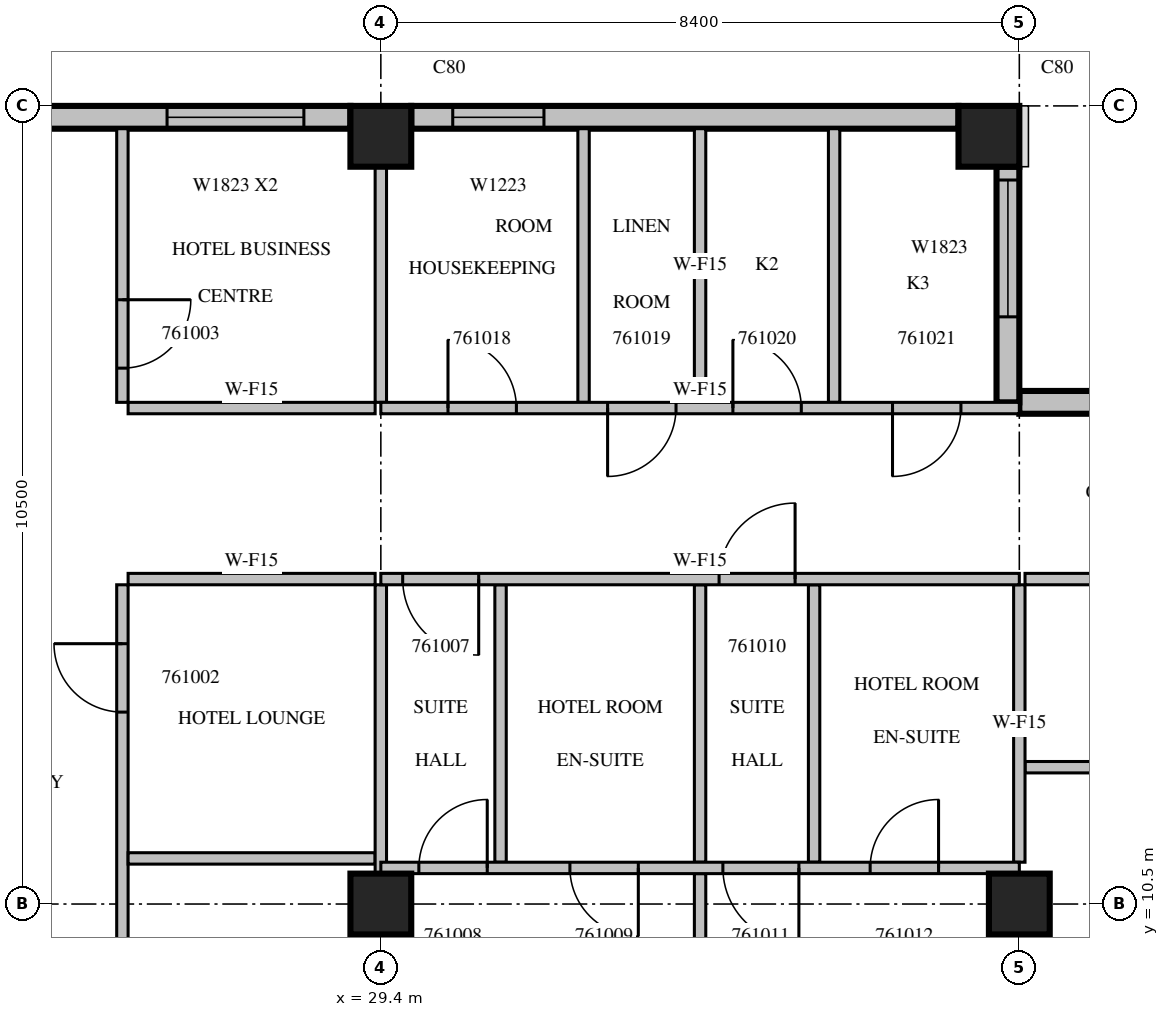
"""IFC4 building model, lengths in metres.
Left out: names, types, materials, properties, quantities, classifications, styles, units other than length and angle.
Written with IfcOpenShell. Run it as: python <this file> out.ifc"""

import sys

from ifc_helpers import new_model, si_unit, direction, frame, frame_2d, origin, origin_2d, place, context, subcontext, project, spatial, rectangle, extrude, source, transform, mapped, element, fill, save


model = new_model("IFC4")
c1 = context("Model", 3, precision=1e-05, world=origin(), true_north=direction((0.0, 1.0)))
c2 = subcontext(c1, "Body", "Model", "MODEL_VIEW")
j1 = project(units=[si_unit("LENGTHUNIT", "METRE"), si_unit("PLANEANGLEUNIT", "RADIAN")], contexts=[c1])
p1 = place(None, origin())
s1 = spatial("IfcSite", under=j1, at=p1, CompositionType="ELEMENT")
p2 = place(p1, origin())
s2 = spatial("IfcBuilding", under=s1, at=p2, CompositionType="ELEMENT")
p3 = place(p2, frame((0.0, 0.0, 265.2)))
s3 = spatial("IfcBuildingStorey", under=s2, at=p3, CompositionType="ELEMENT", Elevation=265.2)
m1 = source(origin(), c2, "Body", "SweptSolid", [
    extrude(rectangle(XDim=0.8, YDim=0.8, at=origin_2d()), origin(), (0.0, 0.0, 1.0), 3.8),
])
for number, where, z_axis, x_axis in (
    (1, (29.4, 10.5, 0.0), (0.0, 0.0, 1.0), (1.0, 0.0, 0.0)),
    (2, (37.8, 10.5, 0.0), (0.0, 0.0, 1.0), (1.0, 0.0, 0.0)),
    (3, (29.4, 20.6, 0.0), (0.0, 0.0, 1.0), (1.0, 0.0, 0.0)),
    (4, (37.4, 20.6, 0.0), (0.0, 0.0, 1.0), (1.0, 0.0, 0.0)),
):
    element("IfcColumn", number, at=place(p3, frame(where, z_axis=z_axis, x_axis=x_axis)), inside=s3, PredefinedType="COLUMN", context=c2, shape_type="MappedRepresentation", body=[
        mapped(m1, transform((0.0, 0.0, 0.0), scale=1.0)),
    ])
m2 = source(origin(), c2, "Body", "SweptSolid", [
    extrude(rectangle(XDim=15.96, YDim=0.3, at=frame_2d((7.98, 0.0))), origin(), (0.0, 0.0, 1.0), 3.4),
])
p4 = place(p3, frame((53.76, 17.1, 0.0), z_axis=(0.0, 0.0, 1.0), x_axis=(-1.0, 0.0, 0.0)))
e5 = element("IfcWall", 5, at=p4, inside=s3, PredefinedType="STANDARD", context=c2, shape_type="MappedRepresentation", body=[
    mapped(m2, transform((0.0, 0.0, 0.0), scale=1.0)),
])
m3 = source(origin(), c2, "Body", "SweptSolid", [
    extrude(rectangle(XDim=3.0, YDim=2.3, at=frame_2d((1.5, 1.15))), frame((0.0, 0.16, 0.0), z_axis=(0.0, -1.0, 0.0), x_axis=(1.0, 0.0, 0.0)), (0.0, 0.0, 1.0), 0.32),
])
p5 = place(p4, frame((0.6, 0.0, 0.6)))
e6 = element("IfcOpeningElement", 6, at=p5, cuts=e5, PredefinedType="OPENING", context=c2, shape_type="MappedRepresentation", body=[
    mapped(m3, transform((0.0, 0.0, 0.0), scale=1.0)),
])
p6 = place(p4, frame((4.8, 0.0, 0.6)))
e7 = element("IfcOpeningElement", 7, at=p6, cuts=e5, PredefinedType="OPENING", context=c2, shape_type="MappedRepresentation", body=[
    mapped(m3, transform((0.0, 0.0, 0.0), scale=1.0)),
])
m4 = source(origin(), c2, "Body", "SweptSolid", [
    extrude(rectangle(XDim=3.6, YDim=2.3, at=frame_2d((1.8, 1.15))), frame((0.0, 0.16, 0.0), z_axis=(0.0, -1.0, 0.0), x_axis=(1.0, 0.0, 0.0)), (0.0, 0.0, 1.0), 0.32),
])
p7 = place(p4, frame((9.54, 0.0, 0.6)))
e8 = element("IfcOpeningElement", 8, at=p7, cuts=e5, PredefinedType="OPENING", context=c2, shape_type="MappedRepresentation", body=[
    mapped(m4, transform((0.0, 0.0, 0.0), scale=1.0)),
])
m5 = source(origin(), c2, "Body", "SweptSolid", [
    extrude(rectangle(XDim=3.1, YDim=0.3, at=frame_2d((1.55, 0.0))), origin(), (0.0, 0.0, 1.0), 3.4),
])
p8 = place(p3, frame((37.65, 17.1, 0.0), z_axis=(0.0, 0.0, 1.0), x_axis=(0.0, 1.0, 0.0)))
e9 = element("IfcWall", 9, at=p8, inside=s3, PredefinedType="STANDARD", context=c2, shape_type="MappedRepresentation", body=[
    mapped(m5, transform((0.0, 0.0, 0.0), scale=1.0)),
])
m6 = source(origin(), c2, "Body", "SweptSolid", [
    extrude(rectangle(XDim=1.8, YDim=2.3, at=frame_2d((0.9, 1.15))), frame((0.0, 0.16, 0.0), z_axis=(0.0, -1.0, 0.0), x_axis=(1.0, 0.0, 0.0)), (0.0, 0.0, 1.0), 0.32),
])
p9 = place(p8, frame((1.125, 0.0, 0.6)))
e10 = element("IfcOpeningElement", 10, at=p9, cuts=e9, PredefinedType="OPENING", context=c2, shape_type="MappedRepresentation", body=[
    mapped(m6, transform((0.0, 0.0, 0.0), scale=1.0)),
])
m7 = source(origin(), c2, "Body", "SweptSolid", [
    extrude(rectangle(XDim=7.2, YDim=0.3, at=frame_2d((3.6, 0.0))), origin(), (0.0, 0.0, 1.0), 3.4),
])
p10 = place(p3, frame((37.0, 20.85, 0.0), z_axis=(0.0, 0.0, 1.0), x_axis=(-1.0, 0.0, 0.0)))
e11 = element("IfcWall", 11, at=p10, inside=s3, PredefinedType="STANDARD", context=c2, shape_type="MappedRepresentation", body=[
    mapped(m7, transform((0.0, 0.0, 0.0), scale=1.0)),
])
m8 = source(origin(), c2, "Body", "SweptSolid", [
    extrude(rectangle(XDim=1.2, YDim=2.3, at=frame_2d((0.6, 1.15))), frame((0.0, 0.16, 0.0), z_axis=(0.0, -1.0, 0.0), x_axis=(1.0, 0.0, 0.0)), (0.0, 0.0, 1.0), 0.32),
])
p11 = place(p10, frame((5.454, 0.0, 0.6)))
e12 = element("IfcOpeningElement", 12, at=p11, cuts=e11, PredefinedType="OPENING", context=c2, shape_type="MappedRepresentation", body=[
    mapped(m8, transform((0.0, 0.0, 0.0), scale=1.0)),
])
p12 = place(p3, frame((29.0, 20.85, 0.0), z_axis=(0.0, 0.0, 1.0), x_axis=(-1.0, 0.0, 0.0)))
e13 = element("IfcWall", 13, at=p12, inside=s3, PredefinedType="STANDARD", context=c2, shape_type="MappedRepresentation", body=[
    mapped(m7, transform((0.0, 0.0, 0.0), scale=1.0)),
])
p13 = place(p12, frame((0.613, 0.0, 0.6)))
e14 = element("IfcOpeningElement", 14, at=p13, cuts=e13, PredefinedType="OPENING", context=c2, shape_type="MappedRepresentation", body=[
    mapped(m6, transform((0.0, 0.0, 0.0), scale=1.0)),
])
p14 = place(p12, frame((5.0, 0.0, 0.6)))
e15 = element("IfcOpeningElement", 15, at=p14, cuts=e13, PredefinedType="OPENING", context=c2, shape_type="MappedRepresentation", body=[
    mapped(m6, transform((0.0, 0.0, 0.0), scale=1.0)),
])
m9 = source(origin(), c2, "Body", "SweptSolid", [
    extrude(rectangle(XDim=11.225, YDim=0.15, at=frame_2d((5.612, 0.0))), origin(), (0.0, 0.0, 1.0), 3.4),
])
p15 = place(p3, frame((26.0, 14.7, 0.0), z_axis=(0.0, 0.0, 1.0), x_axis=(0.0, -1.0, 0.0)))
e16 = element("IfcWall", 16, at=p15, inside=s3, PredefinedType="PARTITIONING", context=c2, shape_type="MappedRepresentation", body=[
    mapped(m9, transform((0.0, 0.0, 0.0), scale=1.0)),
])
m10 = source(origin(), c2, "Body", "SweptSolid", [
    extrude(rectangle(XDim=0.9, YDim=2.1, at=frame_2d((0.45, 1.05))), frame((0.0, 0.085, 0.0), z_axis=(0.0, -1.0, 0.0), x_axis=(1.0, 0.0, 0.0)), (0.0, 0.0, 1.0), 0.17),
])
p16 = place(p15, frame((7.263, 0.0, 0.0)))
e17 = element("IfcOpeningElement", 17, at=p16, cuts=e16, PredefinedType="OPENING", context=c2, shape_type="MappedRepresentation", body=[
    mapped(m10, transform((0.0, 0.0, 0.0), scale=1.0)),
])
p17 = place(p15, frame((0.775, 0.0, 0.0)))
e18 = element("IfcOpeningElement", 18, at=p17, cuts=e16, PredefinedType="OPENING", context=c2, shape_type="MappedRepresentation", body=[
    mapped(m10, transform((0.0, 0.0, 0.0), scale=1.0)),
])
m11 = source(origin(), c2, "Body", "SweptSolid", [
    extrude(rectangle(XDim=3.6, YDim=0.15, at=frame_2d((1.8, 0.0))), origin(), (0.0, 0.0, 1.0), 3.4),
])
p18 = place(p3, frame((26.0, 20.7, 0.0), z_axis=(0.0, 0.0, 1.0), x_axis=(0.0, -1.0, 0.0)))
e19 = element("IfcWall", 19, at=p18, inside=s3, PredefinedType="PARTITIONING", context=c2, shape_type="MappedRepresentation", body=[
    mapped(m11, transform((0.0, 0.0, 0.0), scale=1.0)),
])
p19 = place(p18, frame((2.25, 0.0, 0.0)))
e20 = element("IfcOpeningElement", 20, at=p19, cuts=e19, PredefinedType="OPENING", context=c2, shape_type="MappedRepresentation", body=[
    mapped(m10, transform((0.0, 0.0, 0.0), scale=1.0)),
])
m12 = source(origin(), c2, "Body", "SweptSolid", [
    extrude(rectangle(XDim=3.25, YDim=0.15, at=frame_2d((1.625, 0.0))), origin(), (0.0, 0.0, 1.0), 3.4),
])
for number, where, z_axis, x_axis in (
    (21, (29.325, 11.1, 0.0), (0.0, 0.0, 1.0), (-1.0, 0.0, 0.0)),
    (22, (29.325, 14.775, 0.0), (0.0, 0.0, 1.0), (-1.0, 0.0, 0.0)),
    (23, (26.075, 17.025, 0.0), (0.0, 0.0, 1.0), (1.0, 0.0, 0.0)),
):
    element("IfcWall", number, at=place(p3, frame(where, z_axis=z_axis, x_axis=x_axis)), inside=s3, PredefinedType="PARTITIONING", context=c2, shape_type="MappedRepresentation", body=[
        mapped(m12, transform((0.0, 0.0, 0.0), scale=1.0)),
    ])
m13 = source(origin(), c2, "Body", "SweptSolid", [
    extrude(rectangle(XDim=6.626, YDim=0.15, at=frame_2d((3.313, 0.0))), origin(), (0.0, 0.0, 1.0), 3.4),
])
p20 = place(p3, frame((29.4, 3.475, 0.0), z_axis=(0.0, 0.0, 1.0), x_axis=(0.0, 1.0, 0.0)))
e24 = element("IfcWall", 24, at=p20, inside=s3, PredefinedType="PARTITIONING", context=c2, shape_type="MappedRepresentation", body=[
    mapped(m13, transform((0.0, 0.0, 0.0), scale=1.0)),
])
m14 = source(origin(), c2, "Body", "SweptSolid", [
    extrude(rectangle(XDim=3.801, YDim=0.15, at=frame_2d((1.901, 0.0))), origin(), (0.0, 0.0, 1.0), 3.4),
])
p21 = place(p3, frame((29.4, 10.899, 0.0), z_axis=(0.0, 0.0, 1.0), x_axis=(0.0, 1.0, 0.0)))
e25 = element("IfcWall", 25, at=p21, inside=s3, PredefinedType="PARTITIONING", context=c2, shape_type="MappedRepresentation", body=[
    mapped(m14, transform((0.0, 0.0, 0.0), scale=1.0)),
])
m15 = source(origin(), c2, "Body", "SweptSolid", [
    extrude(rectangle(XDim=3.101, YDim=0.15, at=frame_2d((1.55, 0.0))), origin(), (0.0, 0.0, 1.0), 3.4),
])
p22 = place(p3, frame((29.4, 17.1, 0.0), z_axis=(0.0, 0.0, 1.0), x_axis=(0.0, 1.0, 0.0)))
e26 = element("IfcWall", 26, at=p22, inside=s3, PredefinedType="PARTITIONING", context=c2, shape_type="MappedRepresentation", body=[
    mapped(m15, transform((0.0, 0.0, 0.0), scale=1.0)),
])
m16 = source(origin(), c2, "Body", "SweptSolid", [
    extrude(rectangle(XDim=6.45, YDim=0.15, at=frame_2d((3.225, 0.0))), origin(), (0.0, 0.0, 1.0), 3.4),
])
p23 = place(p3, frame((37.875, 12.3, 0.0), z_axis=(0.0, 0.0, 1.0), x_axis=(1.0, 0.0, 0.0)))
e27 = element("IfcWall", 27, at=p23, inside=s3, PredefinedType="PARTITIONING", context=c2, shape_type="MappedRepresentation", body=[
    mapped(m16, transform((0.0, 0.0, 0.0), scale=1.0)),
])
p24 = place(p3, frame((44.325, 14.775, 0.0), z_axis=(0.0, 0.0, 1.0), x_axis=(-1.0, 0.0, 0.0)))
e28 = element("IfcWall", 28, at=p24, inside=s3, PredefinedType="PARTITIONING", context=c2, shape_type="MappedRepresentation", body=[
    mapped(m16, transform((0.0, 0.0, 0.0), scale=1.0)),
])
p25 = place(p24, frame((2.812, 0.0, 0.0)))
e29 = element("IfcOpeningElement", 29, at=p25, cuts=e28, PredefinedType="OPENING", context=c2, shape_type="MappedRepresentation", body=[
    mapped(m10, transform((0.0, 0.0, 0.0), scale=1.0)),
])
m17 = source(origin(), c2, "Body", "SweptSolid", [
    extrude(rectangle(XDim=10.6, YDim=0.15, at=frame_2d((5.3, 0.0))), origin(), (0.0, 0.0, 1.0), 3.4),
])
p26 = place(p3, frame((33.6, 0.3, 0.0), z_axis=(0.0, 0.0, 1.0), x_axis=(0.0, 1.0, 0.0)))
e30 = element("IfcWall", 30, at=p26, inside=s3, PredefinedType="PARTITIONING", context=c2, shape_type="MappedRepresentation", body=[
    mapped(m17, transform((0.0, 0.0, 0.0), scale=1.0)),
])
m18 = source(origin(), c2, "Body", "SweptSolid", [
    extrude(rectangle(XDim=3.65, YDim=0.15, at=frame_2d((1.825, 0.0))), origin(), (0.0, 0.0, 1.0), 3.4),
])
for number, where, z_axis, x_axis in (
    (31, (30.975, 11.05, 0.0), (0.0, 0.0, 1.0), (0.0, 1.0, 0.0)),
    (32, (33.6, 11.05, 0.0), (0.0, 0.0, 1.0), (0.0, 1.0, 0.0)),
    (33, (35.1, 11.05, 0.0), (0.0, 0.0, 1.0), (0.0, 1.0, 0.0)),
):
    element("IfcWall", number, at=place(p3, frame(where, z_axis=z_axis, x_axis=x_axis)), inside=s3, PredefinedType="PARTITIONING", context=c2, shape_type="MappedRepresentation", body=[
        mapped(m18, transform((0.0, 0.0, 0.0), scale=1.0)),
    ])
m19 = source(origin(), c2, "Body", "SweptSolid", [
    extrude(rectangle(XDim=9.302, YDim=0.15, at=frame_2d((4.651, 0.0))), origin(), (0.0, 0.0, 1.0), 3.4),
])
p27 = place(p3, frame((37.8, 0.799, 0.0), z_axis=(0.0, 0.0, 1.0), x_axis=(0.0, 1.0, 0.0)))
e34 = element("IfcWall", 34, at=p27, inside=s3, PredefinedType="PARTITIONING", context=c2, shape_type="MappedRepresentation", body=[
    mapped(m19, transform((0.0, 0.0, 0.0), scale=1.0)),
])
p28 = place(p3, frame((37.8, 11.05, 0.0), z_axis=(0.0, 0.0, 1.0), x_axis=(0.0, 1.0, 0.0)))
e35 = element("IfcWall", 35, at=p28, inside=s3, PredefinedType="PARTITIONING", context=c2, shape_type="MappedRepresentation", body=[
    mapped(m18, transform((0.0, 0.0, 0.0), scale=1.0)),
])
m20 = source(origin(), c2, "Body", "SweptSolid", [
    extrude(rectangle(XDim=8.4, YDim=0.15, at=frame_2d((4.2, 0.0))), origin(), (0.0, 0.0, 1.0), 3.4),
])
p29 = place(p3, frame((37.8, 10.975, 0.0), z_axis=(0.0, 0.0, 1.0), x_axis=(-1.0, 0.0, 0.0)))
e36 = element("IfcWall", 36, at=p29, inside=s3, PredefinedType="PARTITIONING", context=c2, shape_type="MappedRepresentation", body=[
    mapped(m20, transform((0.0, 0.0, 0.0), scale=1.0)),
])
p30 = place(p29, frame((7.0, 0.0, 0.0)))
e37 = element("IfcOpeningElement", 37, at=p30, cuts=e36, PredefinedType="OPENING", context=c2, shape_type="MappedRepresentation", body=[
    mapped(m10, transform((0.0, 0.0, 0.0), scale=1.0)),
])
p31 = place(p29, frame((5.013, 0.0, 0.0)))
e38 = element("IfcOpeningElement", 38, at=p31, cuts=e36, PredefinedType="OPENING", context=c2, shape_type="MappedRepresentation", body=[
    mapped(m10, transform((0.0, 0.0, 0.0), scale=1.0)),
])
m21 = source(origin(), c2, "Body", "SweptSolid", [
    extrude(rectangle(XDim=1.0, YDim=2.1, at=frame_2d((0.5, 1.05))), frame((0.0, 0.085, 0.0), z_axis=(0.0, -1.0, 0.0), x_axis=(1.0, 0.0, 0.0)), (0.0, 0.0, 1.0), 0.17),
])
p32 = place(p29, frame((2.9, 0.0, 0.0)))
e39 = element("IfcOpeningElement", 39, at=p32, cuts=e36, PredefinedType="OPENING", context=c2, shape_type="MappedRepresentation", body=[
    mapped(m21, transform((0.0, 0.0, 0.0), scale=1.0)),
])
p33 = place(p29, frame((1.062, 0.0, 0.0)))
e40 = element("IfcOpeningElement", 40, at=p33, cuts=e36, PredefinedType="OPENING", context=c2, shape_type="MappedRepresentation", body=[
    mapped(m10, transform((0.0, 0.0, 0.0), scale=1.0)),
])
for number, where, z_axis, x_axis in (
    (41, (32.067, 20.7, 0.0), (0.0, 0.0, 1.0), (0.0, -1.0, 0.0)),
    (42, (35.363, 20.7, 0.0), (0.0, 0.0, 1.0), (0.0, -1.0, 0.0)),
    (43, (33.6, 17.1, 0.0), (0.0, 0.0, 1.0), (0.0, 1.0, 0.0)),
):
    element("IfcWall", number, at=place(p3, frame(where, z_axis=z_axis, x_axis=x_axis)), inside=s3, PredefinedType="PARTITIONING", context=c2, shape_type="MappedRepresentation", body=[
        mapped(m11, transform((0.0, 0.0, 0.0), scale=1.0)),
    ])
p34 = place(p3, frame((37.8, 14.775, 0.0), z_axis=(0.0, 0.0, 1.0), x_axis=(-1.0, 0.0, 0.0)))
e44 = element("IfcWall", 44, at=p34, inside=s3, PredefinedType="PARTITIONING", context=c2, shape_type="MappedRepresentation", body=[
    mapped(m20, transform((0.0, 0.0, 0.0), scale=1.0)),
])
p35 = place(p34, frame((7.112, 0.0, 0.0)))
e45 = element("IfcOpeningElement", 45, at=p35, cuts=e44, PredefinedType="OPENING", context=c2, shape_type="MappedRepresentation", body=[
    mapped(m21, transform((0.0, 0.0, 0.0), scale=1.0)),
])
p36 = place(p34, frame((2.95, 0.0, 0.0)))
e46 = element("IfcOpeningElement", 46, at=p36, cuts=e44, PredefinedType="OPENING", context=c2, shape_type="MappedRepresentation", body=[
    mapped(m21, transform((0.0, 0.0, 0.0), scale=1.0)),
])
p37 = place(p3, frame((29.4, 17.025, 0.0), z_axis=(0.0, 0.0, 1.0), x_axis=(1.0, 0.0, 0.0)))
e47 = element("IfcWall", 47, at=p37, inside=s3, PredefinedType="PARTITIONING", context=c2, shape_type="MappedRepresentation", body=[
    mapped(m20, transform((0.0, 0.0, 0.0), scale=1.0)),
])
p38 = place(p37, frame((0.883, 0.0, 0.0)))
e48 = element("IfcOpeningElement", 48, at=p38, cuts=e47, PredefinedType="OPENING", context=c2, shape_type="MappedRepresentation", body=[
    mapped(m10, transform((0.0, 0.0, 0.0), scale=1.0)),
])
p39 = place(p37, frame((2.983, 0.0, 0.0)))
e49 = element("IfcOpeningElement", 49, at=p39, cuts=e47, PredefinedType="OPENING", context=c2, shape_type="MappedRepresentation", body=[
    mapped(m10, transform((0.0, 0.0, 0.0), scale=1.0)),
])
p40 = place(p37, frame((4.632, 0.0, 0.0)))
e50 = element("IfcOpeningElement", 50, at=p40, cuts=e47, PredefinedType="OPENING", context=c2, shape_type="MappedRepresentation", body=[
    mapped(m10, transform((0.0, 0.0, 0.0), scale=1.0)),
])
p41 = place(p37, frame((6.732, 0.0, 0.0)))
e51 = element("IfcOpeningElement", 51, at=p41, cuts=e47, PredefinedType="OPENING", context=c2, shape_type="MappedRepresentation", body=[
    mapped(m10, transform((0.0, 0.0, 0.0), scale=1.0)),
])
m22 = source(origin(), c2, "Body", "SweptSolid", [
    extrude(rectangle(XDim=1.8, YDim=2.3, at=frame_2d((0.9, 1.15))), frame((0.0, 0.03, 0.0), z_axis=(0.0, -1.0, 0.0), x_axis=(1.0, 0.0, 0.0)), (0.0, 0.0, 1.0), 0.06),
])
p42 = place(p9, origin())
e52 = element("IfcWindow", 52, at=p42, inside=s3, PartitioningType="SINGLE_PANEL", PredefinedType="WINDOW", context=c2, shape_type="MappedRepresentation", body=[
    mapped(m22, transform((0.0, 0.0, 0.0), scale=1.0)),
])
fill(e10, e52)
m23 = source(origin(), c2, "Body", "SweptSolid", [
    extrude(rectangle(XDim=1.2, YDim=2.3, at=frame_2d((0.6, 1.15))), frame((0.0, 0.03, 0.0), z_axis=(0.0, -1.0, 0.0), x_axis=(1.0, 0.0, 0.0)), (0.0, 0.0, 1.0), 0.06),
])
p43 = place(p11, origin())
e53 = element("IfcWindow", 53, at=p43, inside=s3, PartitioningType="SINGLE_PANEL", PredefinedType="WINDOW", context=c2, shape_type="MappedRepresentation", body=[
    mapped(m23, transform((0.0, 0.0, 0.0), scale=1.0)),
])
fill(e12, e53)
p44 = place(p13, origin())
e54 = element("IfcWindow", 54, at=p44, inside=s3, PartitioningType="SINGLE_PANEL", PredefinedType="WINDOW", context=c2, shape_type="MappedRepresentation", body=[
    mapped(m22, transform((0.0, 0.0, 0.0), scale=1.0)),
])
fill(e14, e54)
m24 = source(origin(), c2, "Body", "SweptSolid", [
    extrude(rectangle(XDim=0.9, YDim=2.1, at=frame_2d((0.45, 1.05))), frame((0.0, 0.025, 0.0), z_axis=(0.0, -1.0, 0.0), x_axis=(1.0, 0.0, 0.0)), (0.0, 0.0, 1.0), 0.05),
])
p45 = place(p17, origin())
e55 = element("IfcDoor", 55, at=p45, inside=s3, OperationType="SINGLE_SWING_RIGHT", PredefinedType="DOOR", context=c2, shape_type="MappedRepresentation", body=[
    mapped(m24, transform((0.0, 0.0, 0.0), scale=1.0)),
])
fill(e18, e55)
p46 = place(p19, origin())
e56 = element("IfcDoor", 56, at=p46, inside=s3, OperationType="SINGLE_SWING_LEFT", PredefinedType="DOOR", context=c2, shape_type="MappedRepresentation", body=[
    mapped(m24, transform((0.0, 0.0, 0.0), scale=1.0)),
])
fill(e20, e56)
m25 = source(origin(), c2, "Body", "SweptSolid", [
    extrude(rectangle(XDim=1.0, YDim=2.1, at=frame_2d((0.5, 1.05))), frame((0.0, 0.025, 0.0), z_axis=(0.0, -1.0, 0.0), x_axis=(1.0, 0.0, 0.0)), (0.0, 0.0, 1.0), 0.05),
])
p47 = place(p35, origin())
e57 = element("IfcDoor", 57, at=p47, inside=s3, OperationType="SINGLE_SWING_LEFT", PredefinedType="DOOR", context=c2, shape_type="MappedRepresentation", body=[
    mapped(m25, transform((0.0, 0.0, 0.0), scale=1.0)),
])
fill(e45, e57)
p48 = place(p30, origin())
e58 = element("IfcDoor", 58, at=p48, inside=s3, OperationType="SINGLE_SWING_RIGHT", PredefinedType="DOOR", context=c2, shape_type="MappedRepresentation", body=[
    mapped(m24, transform((0.0, 0.0, 0.0), scale=1.0)),
])
fill(e37, e58)
p49 = place(p31, origin())
e59 = element("IfcDoor", 59, at=p49, inside=s3, OperationType="SINGLE_SWING_LEFT", PredefinedType="DOOR", context=c2, shape_type="MappedRepresentation", body=[
    mapped(m24, transform((0.0, 0.0, 0.0), scale=1.0)),
])
fill(e38, e59)
p50 = place(p36, origin())
e60 = element("IfcDoor", 60, at=p50, inside=s3, OperationType="SINGLE_SWING_RIGHT", PredefinedType="DOOR", context=c2, shape_type="MappedRepresentation", body=[
    mapped(m25, transform((0.0, 0.0, 0.0), scale=1.0)),
])
fill(e46, e60)
p51 = place(p32, origin())
e61 = element("IfcDoor", 61, at=p51, inside=s3, OperationType="SINGLE_SWING_LEFT", PredefinedType="DOOR", context=c2, shape_type="MappedRepresentation", body=[
    mapped(m25, transform((0.0, 0.0, 0.0), scale=1.0)),
])
fill(e39, e61)
p52 = place(p33, origin())
e62 = element("IfcDoor", 62, at=p52, inside=s3, OperationType="SINGLE_SWING_RIGHT", PredefinedType="DOOR", context=c2, shape_type="MappedRepresentation", body=[
    mapped(m24, transform((0.0, 0.0, 0.0), scale=1.0)),
])
fill(e40, e62)
p53 = place(p38, origin())
e63 = element("IfcDoor", 63, at=p53, inside=s3, OperationType="SINGLE_SWING_LEFT", PredefinedType="DOOR", context=c2, shape_type="MappedRepresentation", body=[
    mapped(m24, transform((0.0, 0.0, 0.0), scale=1.0)),
])
fill(e48, e63)
p54 = place(p39, origin())
e64 = element("IfcDoor", 64, at=p54, inside=s3, OperationType="SINGLE_SWING_RIGHT", PredefinedType="DOOR", context=c2, shape_type="MappedRepresentation", body=[
    mapped(m24, transform((0.0, 0.0, 0.0), scale=1.0)),
])
fill(e49, e64)
p55 = place(p40, origin())
e65 = element("IfcDoor", 65, at=p55, inside=s3, OperationType="SINGLE_SWING_LEFT", PredefinedType="DOOR", context=c2, shape_type="MappedRepresentation", body=[
    mapped(m24, transform((0.0, 0.0, 0.0), scale=1.0)),
])
fill(e50, e65)
p56 = place(p41, origin())
e66 = element("IfcDoor", 66, at=p56, inside=s3, OperationType="SINGLE_SWING_RIGHT", PredefinedType="DOOR", context=c2, shape_type="MappedRepresentation", body=[
    mapped(m24, transform((0.0, 0.0, 0.0), scale=1.0)),
])
fill(e51, e66)
save(model, sys.argv[1])
